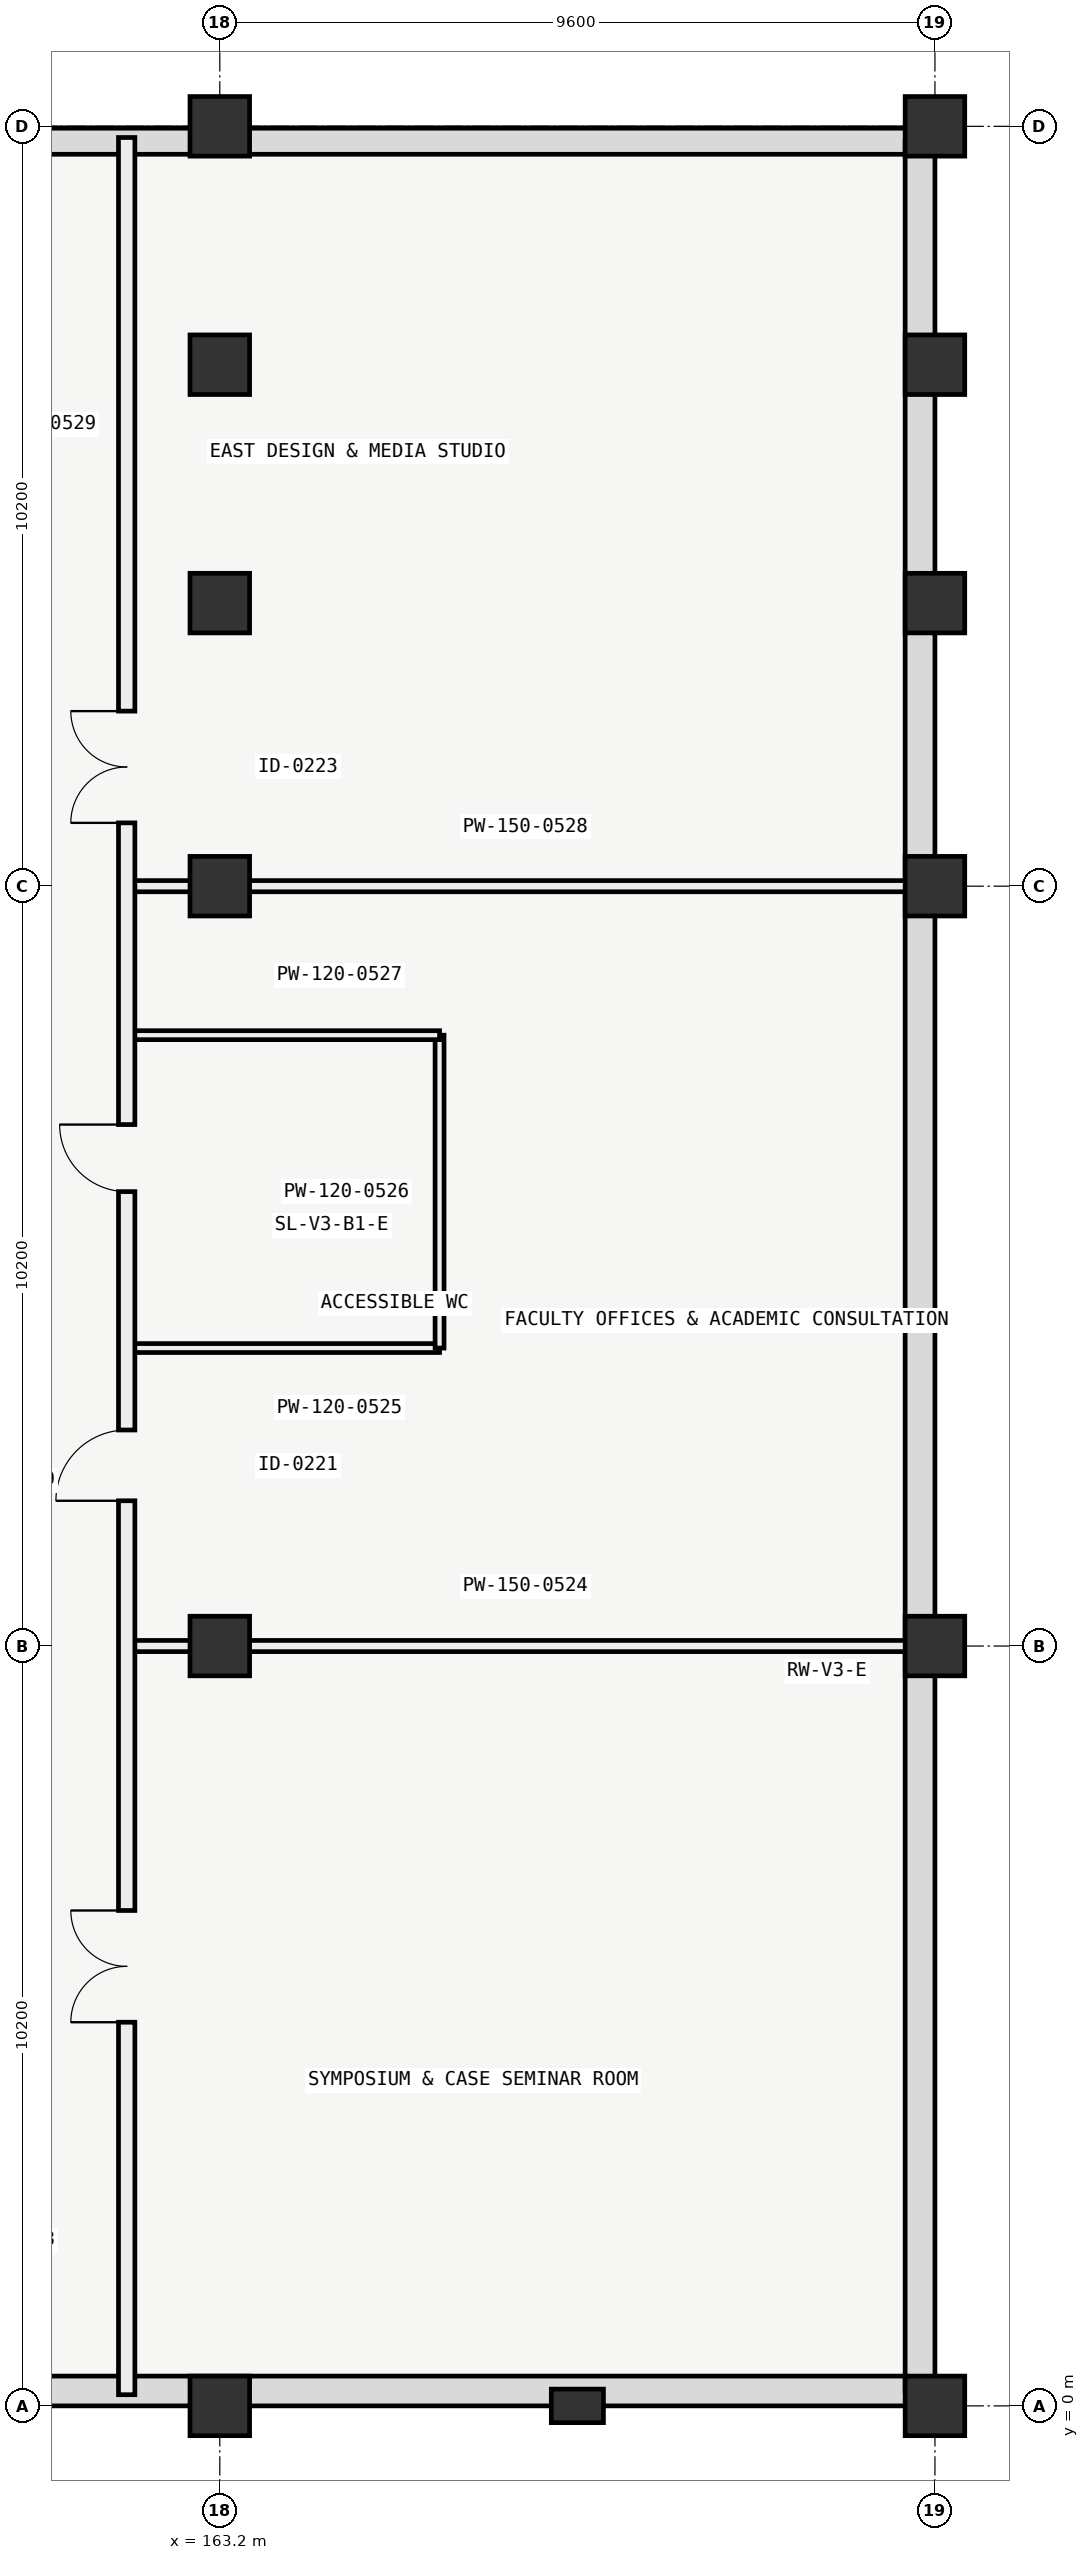
"""IFC4 building model, lengths in metres.
Left out: names, types, materials, properties, quantities, classifications, styles, units other than length and angle.
Written with IfcOpenShell. Run it as: python <this file> out.ifc"""

import sys

from ifc_helpers import new_model, si_unit, direction, frame, frame_2d, origin, origin_2d, place, context, subcontext, project, spatial, rectangle, extrude, element, fill, save


model = new_model("IFC4")
c1 = context("Model", 3, precision=1e-05, world=origin(), true_north=direction((0.0, 1.0)))
c2 = subcontext(c1, "Body", "Model", "MODEL_VIEW")
j1 = project(units=[si_unit("LENGTHUNIT", "METRE"), si_unit("PLANEANGLEUNIT", "RADIAN")], contexts=[c1])
p1 = place(None, origin())
s1 = spatial("IfcSite", under=j1, at=p1, CompositionType="ELEMENT")
p2 = place(p1, origin())
s2 = spatial("IfcBuilding", under=s1, at=p2, CompositionType="ELEMENT")
p3 = place(p2, frame((0.0, 0.0, -4.2)))
s3 = spatial("IfcBuildingStorey", under=s2, at=p3, CompositionType="ELEMENT", Elevation=-4.2)
for number, where, z_axis, x_axis in (
    (1, (163.2, 0.0, 0.0), (0.0, 0.0, 1.0), (1.0, 0.0, 0.0)),
    (2, (163.2, 10.2, 0.0), (0.0, 0.0, 1.0), (1.0, 0.0, 0.0)),
    (3, (163.2, 20.4, 0.0), (0.0, 0.0, 1.0), (1.0, 0.0, 0.0)),
    (4, (163.2, 24.2, 0.0), (0.0, 0.0, 1.0), (1.0, 0.0, 0.0)),
    (5, (163.2, 27.4, 0.0), (0.0, 0.0, 1.0), (1.0, 0.0, 0.0)),
    (6, (163.2, 30.6, 0.0), (0.0, 0.0, 1.0), (1.0, 0.0, 0.0)),
    (7, (172.8, 0.0, 0.0), (0.0, 0.0, 1.0), (1.0, 0.0, 0.0)),
    (8, (172.8, 10.2, 0.0), (0.0, 0.0, 1.0), (1.0, 0.0, 0.0)),
    (9, (172.8, 20.4, 0.0), (0.0, 0.0, 1.0), (1.0, 0.0, 0.0)),
    (10, (172.8, 24.2, 0.0), (0.0, 0.0, 1.0), (1.0, 0.0, 0.0)),
    (11, (172.8, 27.4, 0.0), (0.0, 0.0, 1.0), (1.0, 0.0, 0.0)),
    (12, (172.8, 30.6, 0.0), (0.0, 0.0, 1.0), (1.0, 0.0, 0.0)),
):
    element("IfcColumn", number, at=place(p3, frame(where, z_axis=z_axis, x_axis=x_axis)), inside=s3, PredefinedType="COLUMN", context=c2, shape_type="SweptSolid", body=[
        extrude(rectangle(XDim=0.8, YDim=0.8, at=origin_2d()), origin(), (0.0, 0.0, 1.0), 4.2),
    ])
p4 = place(p3, frame((168.0, 0.0, 0.0), z_axis=(0.0, 0.0, 1.0), x_axis=(0.0, 1.0, 0.0)))
e13 = element("IfcColumn", 13, at=p4, inside=s3, PredefinedType="PILASTER", context=c2, shape_type="SweptSolid", body=[
    extrude(rectangle(XDim=0.45, YDim=0.7, at=origin_2d()), origin(), (0.0, 0.0, 1.0), 4.2),
])
p5 = place(p3, frame((134.6, 0.2, 0.0), z_axis=(0.0, 0.0, 1.0), x_axis=(1.0, 0.0, 0.0)))
e14 = element("IfcWall", 14, at=p5, inside=s3, PredefinedType="USERDEFINED", context=c2, shape_type="SweptSolid", body=[
    extrude(rectangle(XDim=38.0, YDim=0.4, at=frame_2d((19.0, 0.0))), origin(), (0.0, 0.0, 1.0), 3.9),
])
p6 = place(p3, frame((134.6, 30.4, 0.0), z_axis=(0.0, 0.0, 1.0), x_axis=(1.0, 0.0, 0.0)))
e15 = element("IfcWall", 15, at=p6, inside=s3, PredefinedType="USERDEFINED", context=c2, shape_type="SweptSolid", body=[
    extrude(rectangle(XDim=38.0, YDim=0.35, at=frame_2d((19.0, 0.0))), origin(), (0.0, 0.0, 1.0), 3.9),
])
p7 = place(p3, frame((172.6, 0.2, 0.0), z_axis=(0.0, 0.0, 1.0), x_axis=(0.0, 1.0, 0.0)))
e16 = element("IfcWall", 16, at=p7, inside=s3, PredefinedType="USERDEFINED", context=c2, shape_type="SweptSolid", body=[
    extrude(rectangle(XDim=30.2, YDim=0.4, at=frame_2d((15.1, 0.0))), origin(), (0.0, 0.0, 1.0), 3.9),
])
p8 = place(p3, frame((161.95, 10.2, 0.0), z_axis=(0.0, 0.0, 1.0), x_axis=(1.0, 0.0, 0.0)))
e17 = element("IfcWall", 17, at=p8, inside=s3, PredefinedType="PARTITIONING", context=c2, shape_type="SweptSolid", body=[
    extrude(rectangle(XDim=10.7, YDim=0.15, at=frame_2d((5.35, 0.0))), origin(), (0.0, 0.0, 1.0), 3.18),
])
p9 = place(p3, frame((161.95, 14.2, 0.0), z_axis=(0.0, 0.0, 1.0), x_axis=(1.0, 0.0, 0.0)))
e18 = element("IfcWall", 18, at=p9, inside=s3, PredefinedType="PARTITIONING", context=c2, shape_type="SweptSolid", body=[
    extrude(rectangle(XDim=4.2, YDim=0.12, at=frame_2d((2.1, 0.0))), origin(), (0.0, 0.0, 1.0), 3.23),
])
p10 = place(p3, frame((166.15, 14.2, 0.0), z_axis=(0.0, 0.0, 1.0), x_axis=(0.0, 1.0, 0.0)))
e19 = element("IfcWall", 19, at=p10, inside=s3, PredefinedType="PARTITIONING", context=c2, shape_type="SweptSolid", body=[
    extrude(rectangle(XDim=4.2, YDim=0.12, at=frame_2d((2.1, 0.0))), origin(), (0.0, 0.0, 1.0), 3.85),
])
p11 = place(p3, frame((161.95, 18.4, 0.0), z_axis=(0.0, 0.0, 1.0), x_axis=(1.0, 0.0, 0.0)))
e20 = element("IfcWall", 20, at=p11, inside=s3, PredefinedType="PARTITIONING", context=c2, shape_type="SweptSolid", body=[
    extrude(rectangle(XDim=4.2, YDim=0.12, at=frame_2d((2.1, 0.0))), origin(), (0.0, 0.0, 1.0), 3.23),
])
p12 = place(p3, frame((161.95, 20.4, 0.0), z_axis=(0.0, 0.0, 1.0), x_axis=(1.0, 0.0, 0.0)))
e21 = element("IfcWall", 21, at=p12, inside=s3, PredefinedType="PARTITIONING", context=c2, shape_type="SweptSolid", body=[
    extrude(rectangle(XDim=10.7, YDim=0.15, at=frame_2d((5.35, 0.0))), origin(), (0.0, 0.0, 1.0), 3.18),
])
p13 = place(p3, frame((161.95, 0.15, 0.0), z_axis=(0.0, 0.0, 1.0), x_axis=(0.0, 1.0, 0.0)))
e22 = element("IfcWall", 22, at=p13, inside=s3, PredefinedType="PARTITIONING", context=c2, shape_type="SweptSolid", body=[
    extrude(rectangle(XDim=30.3, YDim=0.22, at=frame_2d((15.15, 0.0))), origin(), (0.0, 0.0, 1.0), 3.18),
])
p14 = place(p13, frame((5.0, 0.0, 0.0)))
e23 = element("IfcOpeningElement", 23, at=p14, cuts=e22, PredefinedType="OPENING", context=c2, shape_type="SweptSolid", body=[
    extrude(rectangle(XDim=1.5, YDim=2.2, at=frame_2d((0.75, 1.1))), frame((0.0, 0.12, 0.0), z_axis=(0.0, -1.0, 0.0), x_axis=(1.0, 0.0, 0.0)), (0.0, 0.0, 1.0), 0.24),
])
p15 = place(p13, frame((12.0, 0.0, 0.0)))
e24 = element("IfcOpeningElement", 24, at=p15, cuts=e22, PredefinedType="OPENING", context=c2, shape_type="SweptSolid", body=[
    extrude(rectangle(XDim=0.95, YDim=2.1, at=frame_2d((0.475, 1.05))), frame((0.0, 0.12, 0.0), z_axis=(0.0, -1.0, 0.0), x_axis=(1.0, 0.0, 0.0)), (0.0, 0.0, 1.0), 0.24),
])
p16 = place(p13, frame((16.15, 0.0, 0.0)))
e25 = element("IfcOpeningElement", 25, at=p16, cuts=e22, PredefinedType="OPENING", context=c2, shape_type="SweptSolid", body=[
    extrude(rectangle(XDim=0.9, YDim=2.05, at=frame_2d((0.45, 1.025))), frame((0.0, 0.12, 0.0), z_axis=(0.0, -1.0, 0.0), x_axis=(1.0, 0.0, 0.0)), (0.0, 0.0, 1.0), 0.24),
])
p17 = place(p13, frame((21.1, 0.0, 0.0)))
e26 = element("IfcOpeningElement", 26, at=p17, cuts=e22, PredefinedType="OPENING", context=c2, shape_type="SweptSolid", body=[
    extrude(rectangle(XDim=1.5, YDim=2.2, at=frame_2d((0.75, 1.1))), frame((0.0, 0.12, 0.0), z_axis=(0.0, -1.0, 0.0), x_axis=(1.0, 0.0, 0.0)), (0.0, 0.0, 1.0), 0.24),
])
p18 = place(p14, origin())
e27 = element("IfcDoor", 27, at=p18, inside=s3, OperationType="DOUBLE_DOOR_SINGLE_SWING", PredefinedType="DOOR", context=c2, shape_type="SweptSolid", body=[
    extrude(rectangle(XDim=1.5, YDim=2.2, at=frame_2d((0.75, 1.1))), frame((0.0, 0.025, 0.0), z_axis=(0.0, -1.0, 0.0), x_axis=(1.0, 0.0, 0.0)), (0.0, 0.0, 1.0), 0.05),
])
fill(e23, e27)
p19 = place(p15, origin())
e28 = element("IfcDoor", 28, at=p19, inside=s3, OperationType="SINGLE_SWING_LEFT", PredefinedType="DOOR", context=c2, shape_type="SweptSolid", body=[
    extrude(rectangle(XDim=0.95, YDim=2.1, at=frame_2d((0.475, 1.05))), frame((0.0, 0.025, 0.0), z_axis=(0.0, -1.0, 0.0), x_axis=(1.0, 0.0, 0.0)), (0.0, 0.0, 1.0), 0.05),
])
fill(e24, e28)
p20 = place(p16, origin())
e29 = element("IfcDoor", 29, at=p20, inside=s3, OperationType="SINGLE_SWING_RIGHT", PredefinedType="DOOR", context=c2, shape_type="SweptSolid", body=[
    extrude(rectangle(XDim=0.9, YDim=2.05, at=frame_2d((0.45, 1.025))), frame((0.0, 0.025, 0.0), z_axis=(0.0, -1.0, 0.0), x_axis=(1.0, 0.0, 0.0)), (0.0, 0.0, 1.0), 0.05),
])
fill(e25, e29)
p21 = place(p17, origin())
e30 = element("IfcDoor", 30, at=p21, inside=s3, OperationType="DOUBLE_DOOR_SINGLE_SWING", PredefinedType="DOOR", context=c2, shape_type="SweptSolid", body=[
    extrude(rectangle(XDim=1.5, YDim=2.2, at=frame_2d((0.75, 1.1))), frame((0.0, 0.025, 0.0), z_axis=(0.0, -1.0, 0.0), x_axis=(1.0, 0.0, 0.0)), (0.0, 0.0, 1.0), 0.05),
])
fill(e26, e30)
save(model, sys.argv[1])
